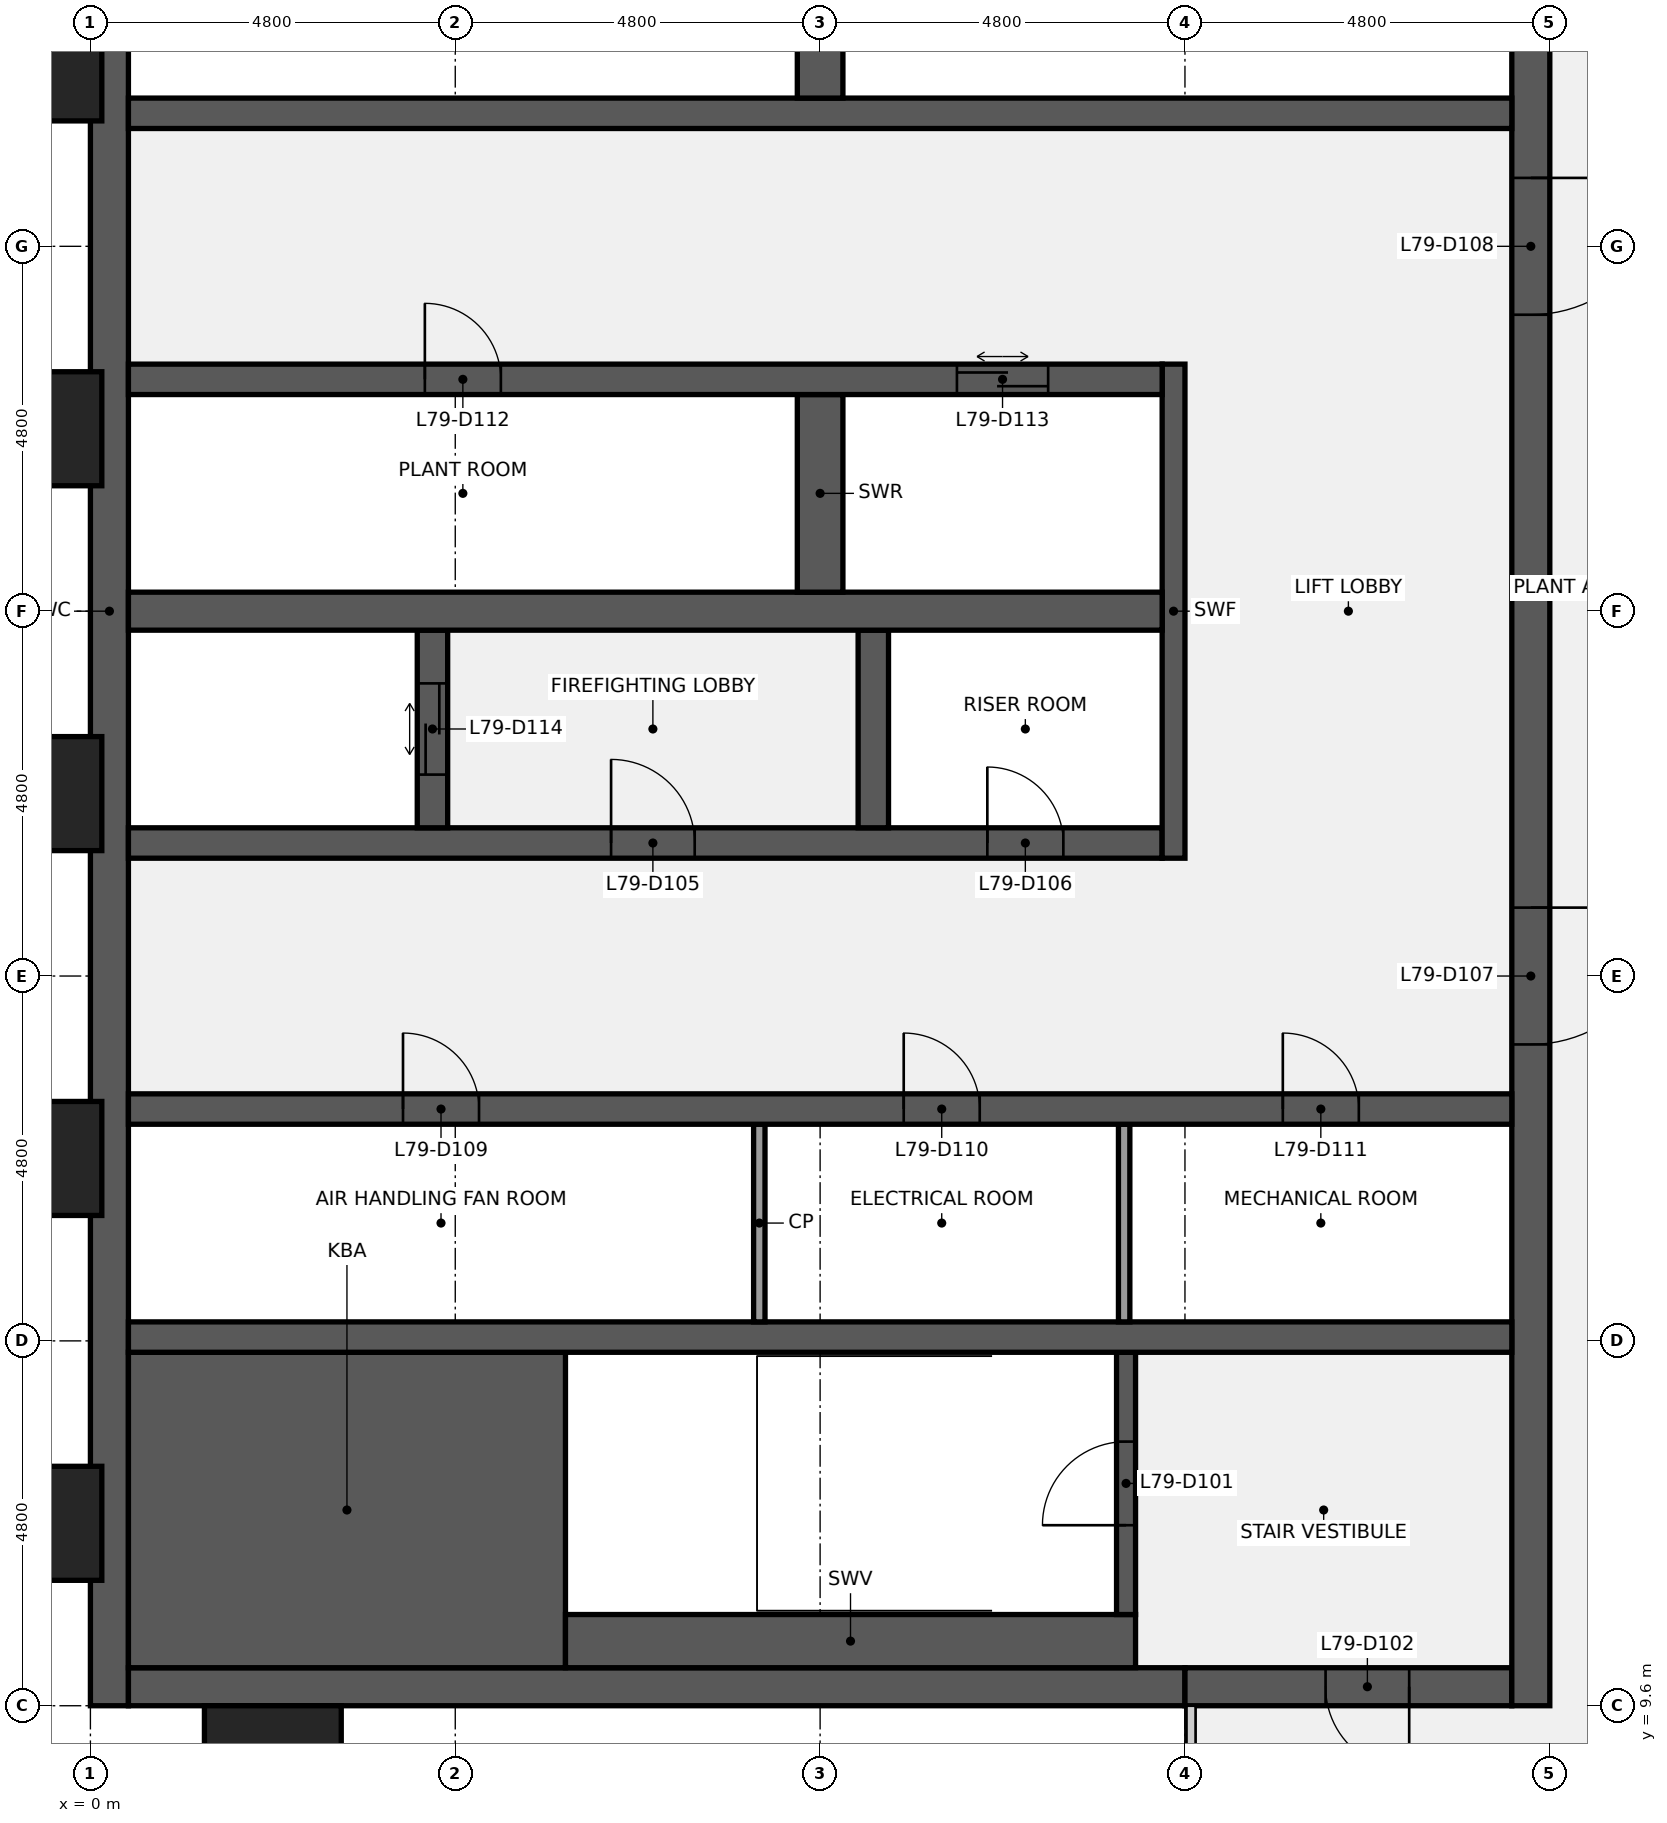
"""IFC4 building model, lengths in metres.
Left out: names, types, materials, properties, quantities, classifications, styles, units other than length and angle.
Written with IfcOpenShell. Run it as: python <this file> out.ifc"""

import sys

from ifc_helpers import new_model, si_unit, direction, frame, frame_2d, origin, origin_2d, place, context, subcontext, project, spatial, rectangle, extrude, element, fill, save


model = new_model("IFC4")
c1 = context("Model", 3, precision=1e-05, world=origin(), true_north=direction((0.0, 1.0)))
c2 = subcontext(c1, "Body", "Model", "MODEL_VIEW")
j1 = project(units=[si_unit("LENGTHUNIT", "METRE"), si_unit("PLANEANGLEUNIT", "RADIAN")], contexts=[c1])
p1 = place(None, origin())
s1 = spatial("IfcSite", under=j1, at=p1, CompositionType="ELEMENT")
p2 = place(p1, origin())
s2 = spatial("IfcBuilding", under=s1, at=p2, CompositionType="ELEMENT")
p3 = place(p2, frame((0.0, 0.0, 354.3)))
s3 = spatial("IfcBuildingStorey", under=s2, at=p3, CompositionType="ELEMENT", Elevation=354.3)
p4 = place(p3, frame((0.25, 9.6, 0.0), z_axis=(0.0, 0.0, 1.0), x_axis=(0.0, 1.0, 0.0)))
e1 = element("IfcWall", 1, at=p4, inside=s3, PredefinedType="SHEAR", context=c2, shape_type="SweptSolid", body=[
    extrude(rectangle(XDim=28.8, YDim=0.5, at=frame_2d((14.4, 0.0))), origin(), (0.0, 0.0, 1.0), 3.75),
])
p5 = place(p3, frame((14.4, 9.85, 0.0), z_axis=(0.0, 0.0, 1.0), x_axis=(-1.0, 0.0, 0.0)))
e2 = element("IfcWall", 2, at=p5, inside=s3, PredefinedType="SHEAR", context=c2, shape_type="SweptSolid", body=[
    extrude(rectangle(XDim=13.9, YDim=0.5, at=frame_2d((6.95, 0.0))), origin(), (0.0, 0.0, 1.0), 3.75),
])
p6 = place(p3, frame((18.7, 9.85, 0.0), z_axis=(0.0, 0.0, 1.0), x_axis=(-1.0, 0.0, 0.0)))
e3 = element("IfcWall", 3, at=p6, inside=s3, PredefinedType="SHEAR", context=c2, shape_type="SweptSolid", body=[
    extrude(rectangle(XDim=4.3, YDim=0.5, at=frame_2d((2.15, 0.0))), origin(), (0.0, 0.0, 1.0), 3.75),
])
p7 = place(p6, frame((1.35, 0.0, 0.0)))
e4 = element("IfcOpeningElement", 4, at=p7, cuts=e3, PredefinedType="OPENING", context=c2, shape_type="SweptSolid", body=[
    extrude(rectangle(XDim=1.1, YDim=2.1, at=frame_2d((0.55, 1.05))), frame((0.0, 0.26, 0.0), z_axis=(0.0, -1.0, 0.0), x_axis=(1.0, 0.0, 0.0)), (0.0, 0.0, 1.0), 0.52),
])
p8 = place(p3, frame((18.95, 38.4, 0.0), z_axis=(0.0, 0.0, 1.0), x_axis=(0.0, -1.0, 0.0)))
e5 = element("IfcWall", 5, at=p8, inside=s3, PredefinedType="SHEAR", context=c2, shape_type="SweptSolid", body=[
    extrude(rectangle(XDim=28.8, YDim=0.5, at=frame_2d((14.4, 0.0))), origin(), (0.0, 0.0, 1.0), 3.75),
])
p9 = place(p8, frame((18.3, 0.0, 0.0)))
e6 = element("IfcOpeningElement", 6, at=p9, cuts=e5, PredefinedType="OPENING", context=c2, shape_type="SweptSolid", body=[
    extrude(rectangle(XDim=1.8, YDim=2.1, at=frame_2d((0.9, 1.05))), frame((0.0, 0.26, 0.0), z_axis=(0.0, -1.0, 0.0), x_axis=(1.0, 0.0, 0.0)), (0.0, 0.0, 1.0), 0.52),
])
p10 = place(p8, frame((8.7, 0.0, 0.0)))
e7 = element("IfcOpeningElement", 7, at=p10, cuts=e5, PredefinedType="OPENING", context=c2, shape_type="SweptSolid", body=[
    extrude(rectangle(XDim=1.8, YDim=2.1, at=frame_2d((0.9, 1.05))), frame((0.0, 0.26, 0.0), z_axis=(0.0, -1.0, 0.0), x_axis=(1.0, 0.0, 0.0)), (0.0, 0.0, 1.0), 0.52),
])
p11 = place(p3, frame((0.5, 12.175, 0.0), z_axis=(0.0, 0.0, 1.0), x_axis=(1.0, 0.0, 0.0)))
e8 = element("IfcWall", 8, at=p11, inside=s3, PredefinedType="SHEAR", context=c2, shape_type="SweptSolid", body=[
    extrude(rectangle(XDim=5.75, YDim=4.15, at=frame_2d((2.875, 0.0))), origin(), (0.0, 0.0, 1.0), 3.75),
])
p12 = place(p3, frame((6.25, 10.45, 0.0), z_axis=(0.0, 0.0, 1.0), x_axis=(1.0, 0.0, 0.0)))
e9 = element("IfcWall", 9, at=p12, inside=s3, PredefinedType="SHEAR", context=c2, shape_type="SweptSolid", body=[
    extrude(rectangle(XDim=7.5, YDim=0.7, at=frame_2d((3.75, 0.0))), origin(), (0.0, 0.0, 1.0), 3.75),
])
p13 = place(p3, frame((13.625, 10.8, 0.0), z_axis=(0.0, 0.0, 1.0), x_axis=(0.0, 1.0, 0.0)))
e10 = element("IfcWall", 10, at=p13, inside=s3, PredefinedType="SHEAR", context=c2, shape_type="SweptSolid", body=[
    extrude(rectangle(XDim=3.45, YDim=0.25, at=frame_2d((1.725, 0.0))), origin(), (0.0, 0.0, 1.0), 3.75),
])
p14 = place(p13, frame((1.175, 0.0, 0.0)))
e11 = element("IfcOpeningElement", 11, at=p14, cuts=e10, PredefinedType="OPENING", context=c2, shape_type="SweptSolid", body=[
    extrude(rectangle(XDim=1.1, YDim=2.1, at=frame_2d((0.55, 1.05))), frame((0.0, 0.135, 0.0), z_axis=(0.0, -1.0, 0.0), x_axis=(1.0, 0.0, 0.0)), (0.0, 0.0, 1.0), 0.27),
])
p15 = place(p3, frame((0.5, 14.45, 0.0), z_axis=(0.0, 0.0, 1.0), x_axis=(1.0, 0.0, 0.0)))
e12 = element("IfcWall", 12, at=p15, inside=s3, PredefinedType="SHEAR", context=c2, shape_type="SweptSolid", body=[
    extrude(rectangle(XDim=18.2, YDim=0.4, at=frame_2d((9.1, 0.0))), origin(), (0.0, 0.0, 1.0), 3.75),
])
for number, where, z_axis, x_axis in (
    (13, (8.8, 14.65, 0.0), (0.0, 0.0, 1.0), (0.0, 1.0, 0.0)),
    (14, (13.6, 14.65, 0.0), (0.0, 0.0, 1.0), (0.0, 1.0, 0.0)),
):
    element("IfcWall", number, at=place(p3, frame(where, z_axis=z_axis, x_axis=x_axis)), inside=s3, PredefinedType="PARTITIONING", context=c2, shape_type="SweptSolid", body=[
        extrude(rectangle(XDim=2.6, YDim=0.15, at=frame_2d((1.3, 0.0))), origin(), (0.0, 0.0, 1.0), 3.75),
    ])
p16 = place(p3, frame((0.5, 17.45, 0.0), z_axis=(0.0, 0.0, 1.0), x_axis=(1.0, 0.0, 0.0)))
e15 = element("IfcWall", 15, at=p16, inside=s3, PredefinedType="SHEAR", context=c2, shape_type="SweptSolid", body=[
    extrude(rectangle(XDim=18.2, YDim=0.4, at=frame_2d((9.1, 0.0))), origin(), (0.0, 0.0, 1.0), 3.75),
])
p17 = place(p16, frame((3.613, 0.0, 0.0)))
e16 = element("IfcOpeningElement", 16, at=p17, cuts=e15, PredefinedType="OPENING", context=c2, shape_type="SweptSolid", body=[
    extrude(rectangle(XDim=1.0, YDim=2.1, at=frame_2d((0.5, 1.05))), frame((0.0, 0.21, 0.0), z_axis=(0.0, -1.0, 0.0), x_axis=(1.0, 0.0, 0.0)), (0.0, 0.0, 1.0), 0.42),
])
p18 = place(p16, frame((10.2, 0.0, 0.0)))
e17 = element("IfcOpeningElement", 17, at=p18, cuts=e15, PredefinedType="OPENING", context=c2, shape_type="SweptSolid", body=[
    extrude(rectangle(XDim=1.0, YDim=2.1, at=frame_2d((0.5, 1.05))), frame((0.0, 0.21, 0.0), z_axis=(0.0, -1.0, 0.0), x_axis=(1.0, 0.0, 0.0)), (0.0, 0.0, 1.0), 0.42),
])
p19 = place(p16, frame((15.188, 0.0, 0.0)))
e18 = element("IfcOpeningElement", 18, at=p19, cuts=e15, PredefinedType="OPENING", context=c2, shape_type="SweptSolid", body=[
    extrude(rectangle(XDim=1.0, YDim=2.1, at=frame_2d((0.5, 1.05))), frame((0.0, 0.21, 0.0), z_axis=(0.0, -1.0, 0.0), x_axis=(1.0, 0.0, 0.0)), (0.0, 0.0, 1.0), 0.42),
])
p20 = place(p3, frame((0.5, 20.95, 0.0), z_axis=(0.0, 0.0, 1.0), x_axis=(1.0, 0.0, 0.0)))
e19 = element("IfcWall", 19, at=p20, inside=s3, PredefinedType="SHEAR", context=c2, shape_type="SweptSolid", body=[
    extrude(rectangle(XDim=13.6, YDim=0.4, at=frame_2d((6.8, 0.0))), origin(), (0.0, 0.0, 1.0), 3.75),
])
p21 = place(p20, frame((6.35, 0.0, 0.0)))
e20 = element("IfcOpeningElement", 20, at=p21, cuts=e19, PredefinedType="OPENING", context=c2, shape_type="SweptSolid", body=[
    extrude(rectangle(XDim=1.1, YDim=2.1, at=frame_2d((0.55, 1.05))), frame((0.0, 0.21, 0.0), z_axis=(0.0, -1.0, 0.0), x_axis=(1.0, 0.0, 0.0)), (0.0, 0.0, 1.0), 0.42),
])
p22 = place(p20, frame((11.3, 0.0, 0.0)))
e21 = element("IfcOpeningElement", 21, at=p22, cuts=e19, PredefinedType="OPENING", context=c2, shape_type="SweptSolid", body=[
    extrude(rectangle(XDim=1.0, YDim=2.1, at=frame_2d((0.5, 1.05))), frame((0.0, 0.21, 0.0), z_axis=(0.0, -1.0, 0.0), x_axis=(1.0, 0.0, 0.0)), (0.0, 0.0, 1.0), 0.42),
])
p23 = place(p3, frame((14.25, 20.75, 0.0), z_axis=(0.0, 0.0, 1.0), x_axis=(0.0, 1.0, 0.0)))
e22 = element("IfcWall", 22, at=p23, inside=s3, PredefinedType="SHEAR", context=c2, shape_type="SweptSolid", body=[
    extrude(rectangle(XDim=6.5, YDim=0.3, at=frame_2d((3.25, 0.0))), origin(), (0.0, 0.0, 1.0), 3.75),
])
p24 = place(p3, frame((4.5, 21.15, 0.0), z_axis=(0.0, 0.0, 1.0), x_axis=(0.0, 1.0, 0.0)))
e23 = element("IfcWall", 23, at=p24, inside=s3, PredefinedType="SHEAR", context=c2, shape_type="SweptSolid", body=[
    extrude(rectangle(XDim=2.6, YDim=0.4, at=frame_2d((1.3, 0.0))), origin(), (0.0, 0.0, 1.0), 3.75),
])
p25 = place(p24, frame((0.7, 0.0, 0.0)))
e24 = element("IfcOpeningElement", 24, at=p25, cuts=e23, PredefinedType="OPENING", context=c2, shape_type="SweptSolid", body=[
    extrude(rectangle(XDim=1.2, YDim=2.1, at=frame_2d((0.6, 1.05))), frame((0.0, 0.21, 0.0), z_axis=(0.0, -1.0, 0.0), x_axis=(1.0, 0.0, 0.0)), (0.0, 0.0, 1.0), 0.42),
])
p26 = place(p3, frame((10.3, 21.15, 0.0), z_axis=(0.0, 0.0, 1.0), x_axis=(0.0, 1.0, 0.0)))
e25 = element("IfcWall", 25, at=p26, inside=s3, PredefinedType="SHEAR", context=c2, shape_type="SweptSolid", body=[
    extrude(rectangle(XDim=2.6, YDim=0.4, at=frame_2d((1.3, 0.0))), origin(), (0.0, 0.0, 1.0), 3.75),
])
p27 = place(p3, frame((0.5, 24.0, 0.0), z_axis=(0.0, 0.0, 1.0), x_axis=(1.0, 0.0, 0.0)))
e26 = element("IfcWall", 26, at=p27, inside=s3, PredefinedType="SHEAR", context=c2, shape_type="SweptSolid", body=[
    extrude(rectangle(XDim=13.6, YDim=0.5, at=frame_2d((6.8, 0.0))), origin(), (0.0, 0.0, 1.0), 3.75),
])
p28 = place(p3, frame((9.6, 24.25, 0.0), z_axis=(0.0, 0.0, 1.0), x_axis=(0.0, 1.0, 0.0)))
e27 = element("IfcWall", 27, at=p28, inside=s3, PredefinedType="SHEAR", context=c2, shape_type="SweptSolid", body=[
    extrude(rectangle(XDim=2.6, YDim=0.6, at=frame_2d((1.3, 0.0))), origin(), (0.0, 0.0, 1.0), 3.75),
])
p29 = place(p3, frame((0.5, 27.05, 0.0), z_axis=(0.0, 0.0, 1.0), x_axis=(1.0, 0.0, 0.0)))
e28 = element("IfcWall", 28, at=p29, inside=s3, PredefinedType="SHEAR", context=c2, shape_type="SweptSolid", body=[
    extrude(rectangle(XDim=13.6, YDim=0.4, at=frame_2d((6.8, 0.0))), origin(), (0.0, 0.0, 1.0), 3.75),
])
p30 = place(p29, frame((3.9, 0.0, 0.0)))
e29 = element("IfcOpeningElement", 29, at=p30, cuts=e28, PredefinedType="OPENING", context=c2, shape_type="SweptSolid", body=[
    extrude(rectangle(XDim=1.0, YDim=2.1, at=frame_2d((0.5, 1.05))), frame((0.0, 0.21, 0.0), z_axis=(0.0, -1.0, 0.0), x_axis=(1.0, 0.0, 0.0)), (0.0, 0.0, 1.0), 0.42),
])
p31 = place(p29, frame((10.9, 0.0, 0.0)))
e30 = element("IfcOpeningElement", 30, at=p31, cuts=e28, PredefinedType="OPENING", context=c2, shape_type="SweptSolid", body=[
    extrude(rectangle(XDim=1.2, YDim=2.1, at=frame_2d((0.6, 1.05))), frame((0.0, 0.21, 0.0), z_axis=(0.0, -1.0, 0.0), x_axis=(1.0, 0.0, 0.0)), (0.0, 0.0, 1.0), 0.42),
])
p32 = place(p3, frame((0.5, 30.55, 0.0), z_axis=(0.0, 0.0, 1.0), x_axis=(1.0, 0.0, 0.0)))
e31 = element("IfcWall", 31, at=p32, inside=s3, PredefinedType="SHEAR", context=c2, shape_type="SweptSolid", body=[
    extrude(rectangle(XDim=18.2, YDim=0.4, at=frame_2d((9.1, 0.0))), origin(), (0.0, 0.0, 1.0), 3.75),
])
p33 = place(p3, frame((9.6, 30.75, 0.0), z_axis=(0.0, 0.0, 1.0), x_axis=(0.0, 1.0, 0.0)))
e32 = element("IfcWall", 32, at=p33, inside=s3, PredefinedType="SHEAR", context=c2, shape_type="SweptSolid", body=[
    extrude(rectangle(XDim=2.6, YDim=0.6, at=frame_2d((1.3, 0.0))), origin(), (0.0, 0.0, 1.0), 3.75),
])
for number, where, z_axis, x_axis in (
    (33, (-0.75, 12.0, 0.0), (0.0, 0.0, 1.0), (0.0, 1.0, 0.0)),
    (34, (-0.75, 16.8, 0.0), (0.0, 0.0, 1.0), (0.0, 1.0, 0.0)),
    (35, (-0.75, 21.6, 0.0), (0.0, 0.0, 1.0), (0.0, 1.0, 0.0)),
    (36, (-0.75, 26.4, 0.0), (0.0, 0.0, 1.0), (0.0, 1.0, 0.0)),
    (37, (-0.75, 31.2, 0.0), (0.0, 0.0, 1.0), (0.0, 1.0, 0.0)),
    (38, (2.4, 8.85, 0.0), (0.0, 0.0, 1.0), (1.0, 0.0, 0.0)),
):
    element("IfcColumn", number, at=place(p3, frame(where, z_axis=z_axis, x_axis=x_axis)), inside=s3, PredefinedType="PILASTER", context=c2, shape_type="SweptSolid", body=[
        extrude(rectangle(XDim=1.8, YDim=1.5, at=origin_2d()), origin(), (0.0, 0.0, 1.0), 4.0),
    ])
p34 = place(p14, origin())
e39 = element("IfcDoor", 39, at=p34, inside=s3, OperationType="SINGLE_SWING_LEFT", PredefinedType="DOOR", context=c2, shape_type="SweptSolid", body=[
    extrude(rectangle(XDim=1.1, YDim=2.1, at=frame_2d((0.55, 1.05))), frame((0.0, 0.025, 0.0), z_axis=(0.0, -1.0, 0.0), x_axis=(1.0, 0.0, 0.0)), (0.0, 0.0, 1.0), 0.05),
])
fill(e11, e39)
p35 = place(p7, origin())
e40 = element("IfcDoor", 40, at=p35, inside=s3, OperationType="SINGLE_SWING_LEFT", PredefinedType="DOOR", context=c2, shape_type="SweptSolid", body=[
    extrude(rectangle(XDim=1.1, YDim=2.1, at=frame_2d((0.55, 1.05))), frame((0.0, 0.025, 0.0), z_axis=(0.0, -1.0, 0.0), x_axis=(1.0, 0.0, 0.0)), (0.0, 0.0, 1.0), 0.05),
])
fill(e4, e40)
p36 = place(p21, origin())
e41 = element("IfcDoor", 41, at=p36, inside=s3, OperationType="SINGLE_SWING_LEFT", PredefinedType="DOOR", context=c2, shape_type="SweptSolid", body=[
    extrude(rectangle(XDim=1.1, YDim=2.1, at=frame_2d((0.55, 1.05))), frame((0.0, 0.025, 0.0), z_axis=(0.0, -1.0, 0.0), x_axis=(1.0, 0.0, 0.0)), (0.0, 0.0, 1.0), 0.05),
])
fill(e20, e41)
p37 = place(p22, origin())
e42 = element("IfcDoor", 42, at=p37, inside=s3, OperationType="SINGLE_SWING_LEFT", PredefinedType="DOOR", context=c2, shape_type="SweptSolid", body=[
    extrude(rectangle(XDim=1.0, YDim=2.1, at=frame_2d((0.5, 1.05))), frame((0.0, 0.025, 0.0), z_axis=(0.0, -1.0, 0.0), x_axis=(1.0, 0.0, 0.0)), (0.0, 0.0, 1.0), 0.05),
])
fill(e21, e42)
p38 = place(p9, origin())
e43 = element("IfcDoor", 43, at=p38, inside=s3, OperationType="DOUBLE_DOOR_SINGLE_SWING", PredefinedType="DOOR", context=c2, shape_type="SweptSolid", body=[
    extrude(rectangle(XDim=1.8, YDim=2.1, at=frame_2d((0.9, 1.05))), frame((0.0, 0.025, 0.0), z_axis=(0.0, -1.0, 0.0), x_axis=(1.0, 0.0, 0.0)), (0.0, 0.0, 1.0), 0.05),
])
fill(e6, e43)
p39 = place(p10, origin())
e44 = element("IfcDoor", 44, at=p39, inside=s3, OperationType="DOUBLE_DOOR_SINGLE_SWING", PredefinedType="DOOR", context=c2, shape_type="SweptSolid", body=[
    extrude(rectangle(XDim=1.8, YDim=2.1, at=frame_2d((0.9, 1.05))), frame((0.0, 0.025, 0.0), z_axis=(0.0, -1.0, 0.0), x_axis=(1.0, 0.0, 0.0)), (0.0, 0.0, 1.0), 0.05),
])
fill(e7, e44)
p40 = place(p17, origin())
e45 = element("IfcDoor", 45, at=p40, inside=s3, OperationType="SINGLE_SWING_LEFT", PredefinedType="DOOR", context=c2, shape_type="SweptSolid", body=[
    extrude(rectangle(XDim=1.0, YDim=2.1, at=frame_2d((0.5, 1.05))), frame((0.0, 0.025, 0.0), z_axis=(0.0, -1.0, 0.0), x_axis=(1.0, 0.0, 0.0)), (0.0, 0.0, 1.0), 0.05),
])
fill(e16, e45)
p41 = place(p18, origin())
e46 = element("IfcDoor", 46, at=p41, inside=s3, OperationType="SINGLE_SWING_LEFT", PredefinedType="DOOR", context=c2, shape_type="SweptSolid", body=[
    extrude(rectangle(XDim=1.0, YDim=2.1, at=frame_2d((0.5, 1.05))), frame((0.0, 0.025, 0.0), z_axis=(0.0, -1.0, 0.0), x_axis=(1.0, 0.0, 0.0)), (0.0, 0.0, 1.0), 0.05),
])
fill(e17, e46)
p42 = place(p19, origin())
e47 = element("IfcDoor", 47, at=p42, inside=s3, OperationType="SINGLE_SWING_LEFT", PredefinedType="DOOR", context=c2, shape_type="SweptSolid", body=[
    extrude(rectangle(XDim=1.0, YDim=2.1, at=frame_2d((0.5, 1.05))), frame((0.0, 0.025, 0.0), z_axis=(0.0, -1.0, 0.0), x_axis=(1.0, 0.0, 0.0)), (0.0, 0.0, 1.0), 0.05),
])
fill(e18, e47)
p43 = place(p30, origin())
e48 = element("IfcDoor", 48, at=p43, inside=s3, OperationType="SINGLE_SWING_LEFT", PredefinedType="DOOR", context=c2, shape_type="SweptSolid", body=[
    extrude(rectangle(XDim=1.0, YDim=2.1, at=frame_2d((0.5, 1.05))), frame((0.0, 0.025, 0.0), z_axis=(0.0, -1.0, 0.0), x_axis=(1.0, 0.0, 0.0)), (0.0, 0.0, 1.0), 0.05),
])
fill(e29, e48)
p44 = place(p31, origin())
e49 = element("IfcDoor", 49, at=p44, inside=s3, OperationType="DOUBLE_DOOR_SLIDING", PredefinedType="DOOR", context=c2, shape_type="SweptSolid", body=[
    extrude(rectangle(XDim=1.2, YDim=2.1, at=frame_2d((0.6, 1.05))), frame((0.0, 0.025, 0.0), z_axis=(0.0, -1.0, 0.0), x_axis=(1.0, 0.0, 0.0)), (0.0, 0.0, 1.0), 0.05),
])
fill(e30, e49)
p45 = place(p25, origin())
e50 = element("IfcDoor", 50, at=p45, inside=s3, OperationType="DOUBLE_DOOR_SLIDING", PredefinedType="DOOR", context=c2, shape_type="SweptSolid", body=[
    extrude(rectangle(XDim=1.2, YDim=2.1, at=frame_2d((0.6, 1.05))), frame((0.0, 0.025, 0.0), z_axis=(0.0, -1.0, 0.0), x_axis=(1.0, 0.0, 0.0)), (0.0, 0.0, 1.0), 0.05),
])
fill(e24, e50)
save(model, sys.argv[1])
